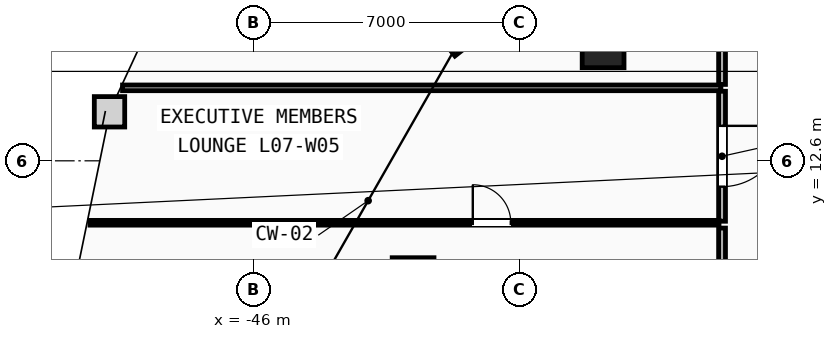
"""IFC4 building model, lengths in metres.
Left out: names, types, materials, properties, quantities, classifications, styles, units other than length and angle.
Written with IfcOpenShell. Run it as: python <this file> out.ifc"""

import sys

from ifc_helpers import new_model, si_unit, direction, frame, frame_2d, origin, origin_2d, place, context, subcontext, project, spatial, rectangle, extrude, element, fill, save


model = new_model("IFC4")
c1 = context("Model", 3, precision=1e-05, world=origin(), true_north=direction((0.0, 1.0)))
c2 = subcontext(c1, "Body", "Model", "MODEL_VIEW")
j1 = project(units=[si_unit("LENGTHUNIT", "METRE"), si_unit("PLANEANGLEUNIT", "RADIAN")], contexts=[c1])
p1 = place(None, origin())
s1 = spatial("IfcSite", under=j1, at=p1, CompositionType="ELEMENT")
p2 = place(p1, origin())
s2 = spatial("IfcBuilding", under=s1, at=p2, CompositionType="ELEMENT")
p3 = place(p2, frame((0.0, 0.0, 31.6)))
s3 = spatial("IfcBuildingStorey", under=s2, at=p3, CompositionType="ELEMENT", Elevation=31.6)
for number, where, z_axis, x_axis in (
    (1, (-41.8, 9.5, 0.0), (0.0, 0.0, 1.0), (1.0, 0.0, 0.0)),
    (2, (-36.8, 15.6, 0.0), (0.0, 0.0, 1.0), (1.0, 0.0, 0.0)),
):
    element("IfcColumn", number, at=place(p3, frame(where, z_axis=z_axis, x_axis=x_axis)), inside=s3, PredefinedType="COLUMN", context=c2, shape_type="SweptSolid", body=[
        extrude(rectangle(XDim=1.1, YDim=1.1, at=origin_2d()), origin(), (0.0, 0.0, 1.0), 3.8),
    ])
p4 = place(p3, frame((-40.6, 16.2, 0.0), z_axis=(0.0, 0.0, 1.0), x_axis=(-0.785100778485, -0.619368038909, 0.0)))
e3 = element("IfcColumn", 3, at=p4, inside=s3, PredefinedType="COLUMN", context=c2, shape_type="SweptSolid", body=[
    extrude(rectangle(XDim=1.2, YDim=1.2, at=origin_2d()), origin(), (0.0, 0.0, 1.0), 3.8),
])
p5 = place(p3, frame((-49.445, 14.52, 0.0), z_axis=(0.0, 0.0, 1.0), x_axis=(1.0, 0.0, 0.0)))
e4 = element("IfcWall", 4, at=p5, inside=s3, PredefinedType="PARTITIONING", context=c2, shape_type="SweptSolid", body=[
    extrude(rectangle(XDim=15.745, YDim=0.15, at=frame_2d((7.873, 0.0))), origin(), (0.0, 0.0, 1.0), 3.5),
])
p6 = place(p3, frame((-33.67, 17.428, 0.0), z_axis=(0.0, 0.0, 1.0), x_axis=(0.0, -1.0, 0.0)))
e5 = element("IfcWall", 5, at=p6, inside=s3, PredefinedType="PARTITIONING", context=c2, shape_type="SweptSolid", body=[
    extrude(rectangle(XDim=2.818, YDim=0.18, at=frame_2d((1.409, 0.0))), origin(), (0.0, 0.0, 1.0), 3.5),
])
p7 = place(p3, frame((-33.67, 10.83, 0.0), z_axis=(0.0, 0.0, 1.0), x_axis=(0.0, -1.0, 0.0)))
e6 = element("IfcWall", 6, at=p7, inside=s3, PredefinedType="PARTITIONING", context=c2, shape_type="SweptSolid", body=[
    extrude(rectangle(XDim=1.129, YDim=0.18, at=frame_2d((0.564, 0.0))), origin(), (0.0, 0.0, 1.0), 3.5),
])
p8 = place(p3, frame((-33.67, 14.43, 0.0), z_axis=(0.0, 0.0, 1.0), x_axis=(0.0, -1.0, 0.0)))
e7 = element("IfcWall", 7, at=p8, inside=s3, PredefinedType="PARTITIONING", context=c2, shape_type="SweptSolid", body=[
    extrude(rectangle(XDim=3.42, YDim=0.18, at=frame_2d((1.71, 0.0))), origin(), (0.0, 0.0, 1.0), 3.5),
])
p9 = place(p8, frame((0.91, 0.0, 0.0)))
e8 = element("IfcOpeningElement", 8, at=p9, cuts=e7, PredefinedType="OPENING", context=c2, shape_type="SweptSolid", body=[
    extrude(rectangle(XDim=1.6, YDim=2.2, at=frame_2d((0.8, 1.1))), frame((0.0, 0.1, 0.0), z_axis=(0.0, -1.0, 0.0), x_axis=(1.0, 0.0, 0.0)), (0.0, 0.0, 1.0), 0.2),
])
p10 = place(p3, frame((-50.302, 10.97, 0.0), z_axis=(0.0, 0.0, 1.0), x_axis=(1.0, 0.0, 0.0)))
e9 = element("IfcWall", 9, at=p10, inside=s3, PredefinedType="PARTITIONING", context=c2, shape_type="SweptSolid", body=[
    extrude(rectangle(XDim=16.552, YDim=0.125, at=frame_2d((8.276, 0.0))), origin(), (0.0, 0.0, 1.0), 3.5),
])
p11 = place(p10, frame((10.073, 0.0, 0.0)))
e10 = element("IfcOpeningElement", 10, at=p11, cuts=e9, PredefinedType="OPENING", context=c2, shape_type="SweptSolid", body=[
    extrude(rectangle(XDim=1.0, YDim=2.15, at=frame_2d((0.5, 1.075))), frame((0.0, 0.073, 0.0), z_axis=(0.0, -1.0, 0.0), x_axis=(1.0, 0.0, 0.0)), (0.0, 0.0, 1.0), 0.145),
])
p12 = place(p11, origin())
e11 = element("IfcDoor", 11, at=p12, inside=s3, OperationType="SINGLE_SWING_LEFT", PredefinedType="DOOR", context=c2, shape_type="SweptSolid", body=[
    extrude(rectangle(XDim=1.0, YDim=2.15, at=frame_2d((0.5, 1.075))), frame((0.0, 0.025, 0.0), z_axis=(0.0, -1.0, 0.0), x_axis=(1.0, 0.0, 0.0)), (0.0, 0.0, 1.0), 0.05),
])
fill(e10, e11)
p13 = place(p9, origin())
e12 = element("IfcDoor", 12, at=p13, inside=s3, OperationType="SINGLE_SWING_LEFT", PredefinedType="DOOR", context=c2, shape_type="SweptSolid", body=[
    extrude(rectangle(XDim=1.6, YDim=2.2, at=frame_2d((0.8, 1.1))), frame((0.0, 0.025, 0.0), z_axis=(0.0, -1.0, 0.0), x_axis=(1.0, 0.0, 0.0)), (0.0, 0.0, 1.0), 0.05),
])
fill(e8, e12)
save(model, sys.argv[1])
